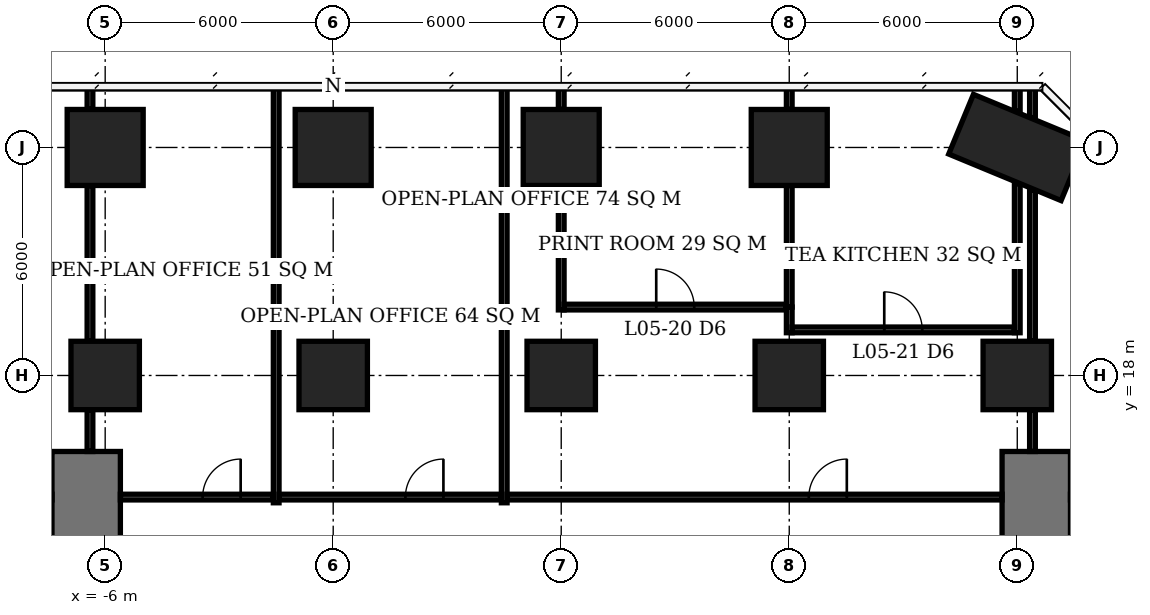
"""IFC4 building model, lengths in metres.
Left out: names, types, materials, properties, quantities, classifications, styles, units other than length and angle.
Written with IfcOpenShell. Run it as: python <this file> out.ifc"""

import sys

from ifc_helpers import new_model, si_unit, direction, frame, frame_2d, origin, origin_2d, place, context, subcontext, project, spatial, rectangle, extrude, element, fill, save


model = new_model("IFC4")
c1 = context("Model", 3, precision=1e-05, world=origin(), true_north=direction((0.0, 1.0)))
c2 = subcontext(c1, "Body", "Model", "MODEL_VIEW")
j1 = project(units=[si_unit("LENGTHUNIT", "METRE"), si_unit("PLANEANGLEUNIT", "RADIAN")], contexts=[c1])
p1 = place(None, origin())
s1 = spatial("IfcSite", under=j1, at=p1, CompositionType="ELEMENT")
p2 = place(p1, origin())
s2 = spatial("IfcBuilding", under=s1, at=p2, CompositionType="ELEMENT")
p3 = place(p2, frame((0.0, 0.0, 26.0)))
s3 = spatial("IfcBuildingStorey", under=s2, at=p3, CompositionType="ELEMENT", Elevation=26.0)
p4 = place(p3, frame((-6.0, 18.0, 0.0), z_axis=(0.0, 0.0, 1.0), x_axis=(1.0, 0.0, 0.0)))
e1 = element("IfcColumn", 1, at=p4, inside=s3, PredefinedType="COLUMN", context=c2, shape_type="SweptSolid", body=[
    extrude(rectangle(XDim=1.8, YDim=1.8, at=origin_2d()), origin(), (0.0, 0.0, 1.0), 3.9),
])
p5 = place(p3, frame((-6.0, 24.0, 0.0), z_axis=(0.0, 0.0, 1.0), x_axis=(1.0, 0.0, 0.0)))
e2 = element("IfcColumn", 2, at=p5, inside=s3, PredefinedType="COLUMN", context=c2, shape_type="SweptSolid", body=[
    extrude(rectangle(XDim=2.0, YDim=2.0, at=origin_2d()), origin(), (0.0, 0.0, 1.0), 3.9),
])
p6 = place(p3, frame((0.0, 18.0, 0.0), z_axis=(0.0, 0.0, 1.0), x_axis=(1.0, 0.0, 0.0)))
e3 = element("IfcColumn", 3, at=p6, inside=s3, PredefinedType="COLUMN", context=c2, shape_type="SweptSolid", body=[
    extrude(rectangle(XDim=1.8, YDim=1.8, at=origin_2d()), origin(), (0.0, 0.0, 1.0), 3.9),
])
p7 = place(p3, frame((0.0, 24.0, 0.0), z_axis=(0.0, 0.0, 1.0), x_axis=(1.0, 0.0, 0.0)))
e4 = element("IfcColumn", 4, at=p7, inside=s3, PredefinedType="COLUMN", context=c2, shape_type="SweptSolid", body=[
    extrude(rectangle(XDim=2.0, YDim=2.0, at=origin_2d()), origin(), (0.0, 0.0, 1.0), 3.9),
])
p8 = place(p3, frame((6.0, 18.0, 0.0), z_axis=(0.0, 0.0, 1.0), x_axis=(1.0, 0.0, 0.0)))
e5 = element("IfcColumn", 5, at=p8, inside=s3, PredefinedType="COLUMN", context=c2, shape_type="SweptSolid", body=[
    extrude(rectangle(XDim=1.8, YDim=1.8, at=origin_2d()), origin(), (0.0, 0.0, 1.0), 3.9),
])
p9 = place(p3, frame((6.0, 24.0, 0.0), z_axis=(0.0, 0.0, 1.0), x_axis=(1.0, 0.0, 0.0)))
e6 = element("IfcColumn", 6, at=p9, inside=s3, PredefinedType="COLUMN", context=c2, shape_type="SweptSolid", body=[
    extrude(rectangle(XDim=2.0, YDim=2.0, at=origin_2d()), origin(), (0.0, 0.0, 1.0), 3.9),
])
p10 = place(p3, frame((12.0, 18.0, 0.0), z_axis=(0.0, 0.0, 1.0), x_axis=(1.0, 0.0, 0.0)))
e7 = element("IfcColumn", 7, at=p10, inside=s3, PredefinedType="COLUMN", context=c2, shape_type="SweptSolid", body=[
    extrude(rectangle(XDim=1.8, YDim=1.8, at=origin_2d()), origin(), (0.0, 0.0, 1.0), 3.9),
])
p11 = place(p3, frame((12.0, 24.0, 0.0), z_axis=(0.0, 0.0, 1.0), x_axis=(1.0, 0.0, 0.0)))
e8 = element("IfcColumn", 8, at=p11, inside=s3, PredefinedType="COLUMN", context=c2, shape_type="SweptSolid", body=[
    extrude(rectangle(XDim=2.0, YDim=2.0, at=origin_2d()), origin(), (0.0, 0.0, 1.0), 3.9),
])
p12 = place(p3, frame((18.0, 18.0, 0.0), z_axis=(0.0, 0.0, 1.0), x_axis=(1.0, 0.0, 0.0)))
e9 = element("IfcColumn", 9, at=p12, inside=s3, PredefinedType="COLUMN", context=c2, shape_type="SweptSolid", body=[
    extrude(rectangle(XDim=1.8, YDim=1.8, at=origin_2d()), origin(), (0.0, 0.0, 1.0), 3.9),
])
p13 = place(p3, frame((18.0, 24.0, 0.0), z_axis=(0.0, 0.0, 1.0), x_axis=(0.923879532511, -0.382683432365, 0.0)))
e10 = element("IfcColumn", 10, at=p13, inside=s3, PredefinedType="COLUMN", context=c2, shape_type="SweptSolid", body=[
    extrude(rectangle(XDim=3.2, YDim=1.7, at=origin_2d()), origin(), (0.0, 0.0, 1.0), 3.9),
])
for number, where, z_axis, x_axis in (
    (11, (-6.5, 13.6, 0.0), (0.0, 0.0, 1.0), (0.0, 1.0, 0.0)),
    (12, (18.5, 13.6, 0.0), (0.0, 0.0, 1.0), (0.0, 1.0, 0.0)),
):
    element("IfcWall", number, at=place(p3, frame(where, z_axis=z_axis, x_axis=x_axis)), inside=s3, PredefinedType="SHEAR", context=c2, shape_type="SweptSolid", body=[
        extrude(rectangle(XDim=2.4, YDim=1.8, at=frame_2d((1.2, 0.0))), origin(), (0.0, 0.0, 1.0), 3.9),
    ])
p14 = place(p3, frame((12.075, 19.2, 0.0), z_axis=(0.0, 0.0, 1.0), x_axis=(1.0, 0.0, 0.0)))
e13 = element("IfcWall", 13, at=p14, inside=s3, PredefinedType="PARTITIONING", context=c2, shape_type="SweptSolid", body=[
    extrude(rectangle(XDim=5.85, YDim=0.15, at=frame_2d((2.925, 0.0))), origin(), (0.0, 0.0, 1.0), 3.65),
])
p15 = place(p14, frame((2.425, 0.0, 0.0)))
e14 = element("IfcOpeningElement", 14, at=p15, cuts=e13, PredefinedType="OPENING", context=c2, shape_type="SweptSolid", body=[
    extrude(rectangle(XDim=1.0, YDim=2.1, at=frame_2d((0.5, 1.05))), frame((0.0, 0.085, 0.0), z_axis=(0.0, -1.0, 0.0), x_axis=(1.0, 0.0, 0.0)), (0.0, 0.0, 1.0), 0.17),
])
p16 = place(p3, frame((6.075, 19.8, 0.0), z_axis=(0.0, 0.0, 1.0), x_axis=(1.0, 0.0, 0.0)))
e15 = element("IfcWall", 15, at=p16, inside=s3, PredefinedType="PARTITIONING", context=c2, shape_type="SweptSolid", body=[
    extrude(rectangle(XDim=5.85, YDim=0.15, at=frame_2d((2.925, 0.0))), origin(), (0.0, 0.0, 1.0), 3.65),
])
p17 = place(p16, frame((2.425, 0.0, 0.0)))
e16 = element("IfcOpeningElement", 16, at=p17, cuts=e15, PredefinedType="OPENING", context=c2, shape_type="SweptSolid", body=[
    extrude(rectangle(XDim=1.0, YDim=2.1, at=frame_2d((0.5, 1.05))), frame((0.0, 0.085, 0.0), z_axis=(0.0, -1.0, 0.0), x_axis=(1.0, 0.0, 0.0)), (0.0, 0.0, 1.0), 0.17),
])
p18 = place(p3, frame((6.0, 19.725, 0.0), z_axis=(0.0, 0.0, 1.0), x_axis=(0.0, 1.0, 0.0)))
e17 = element("IfcWall", 17, at=p18, inside=s3, PredefinedType="PARTITIONING", context=c2, shape_type="SweptSolid", body=[
    extrude(rectangle(XDim=3.275, YDim=0.15, at=frame_2d((1.637, 0.0))), origin(), (0.0, 0.0, 1.0), 3.65),
])
p19 = place(p3, frame((6.0, 25.0, 0.0), z_axis=(0.0, 0.0, 1.0), x_axis=(0.0, 1.0, 0.0)))
e18 = element("IfcWall", 18, at=p19, inside=s3, PredefinedType="PARTITIONING", context=c2, shape_type="SweptSolid", body=[
    extrude(rectangle(XDim=0.6, YDim=0.15, at=frame_2d((0.3, 0.0))), origin(), (0.0, 0.0, 1.0), 3.65),
])
p20 = place(p3, frame((12.0, 19.125, 0.0), z_axis=(0.0, 0.0, 1.0), x_axis=(0.0, 1.0, 0.0)))
e19 = element("IfcWall", 19, at=p20, inside=s3, PredefinedType="PARTITIONING", context=c2, shape_type="SweptSolid", body=[
    extrude(rectangle(XDim=0.675, YDim=0.15, at=frame_2d((0.337, 0.0))), origin(), (0.0, 0.0, 1.0), 3.65),
])
p21 = place(p3, frame((12.0, 19.8, 0.0), z_axis=(0.0, 0.0, 1.0), x_axis=(0.0, 1.0, 0.0)))
e20 = element("IfcWall", 20, at=p21, inside=s3, PredefinedType="PARTITIONING", context=c2, shape_type="SweptSolid", body=[
    extrude(rectangle(XDim=3.2, YDim=0.15, at=frame_2d((1.6, 0.0))), origin(), (0.0, 0.0, 1.0), 3.65),
])
p22 = place(p3, frame((12.0, 25.0, 0.0), z_axis=(0.0, 0.0, 1.0), x_axis=(0.0, 1.0, 0.0)))
e21 = element("IfcWall", 21, at=p22, inside=s3, PredefinedType="PARTITIONING", context=c2, shape_type="SweptSolid", body=[
    extrude(rectangle(XDim=0.6, YDim=0.15, at=frame_2d((0.3, 0.0))), origin(), (0.0, 0.0, 1.0), 3.65),
])
p23 = place(p3, frame((18.0, 19.125, 0.0), z_axis=(0.0, 0.0, 1.0), x_axis=(0.0, 1.0, 0.0)))
e22 = element("IfcWall", 22, at=p23, inside=s3, PredefinedType="PARTITIONING", context=c2, shape_type="SweptSolid", body=[
    extrude(rectangle(XDim=3.924, YDim=0.15, at=frame_2d((1.962, 0.0))), origin(), (0.0, 0.0, 1.0), 3.65),
])
p24 = place(p3, frame((18.0, 24.951, 0.0), z_axis=(0.0, 0.0, 1.0), x_axis=(0.0, 1.0, 0.0)))
e23 = element("IfcWall", 23, at=p24, inside=s3, PredefinedType="PARTITIONING", context=c2, shape_type="SweptSolid", body=[
    extrude(rectangle(XDim=0.649, YDim=0.15, at=frame_2d((0.324, 0.0))), origin(), (0.0, 0.0, 1.0), 3.65),
])
p25 = place(p3, frame((-6.4, 16.0, 0.0), z_axis=(0.0, 0.0, 1.0), x_axis=(0.0, 1.0, 0.0)))
e24 = element("IfcWall", 24, at=p25, inside=s3, PredefinedType="PARTITIONING", context=c2, shape_type="SweptSolid", body=[
    extrude(rectangle(XDim=1.1, YDim=0.15, at=frame_2d((0.55, 0.0))), origin(), (0.0, 0.0, 1.0), 3.65),
])
p26 = place(p3, frame((-6.4, 18.9, 0.0), z_axis=(0.0, 0.0, 1.0), x_axis=(0.0, 1.0, 0.0)))
e25 = element("IfcWall", 25, at=p26, inside=s3, PredefinedType="PARTITIONING", context=c2, shape_type="SweptSolid", body=[
    extrude(rectangle(XDim=4.1, YDim=0.15, at=frame_2d((2.05, 0.0))), origin(), (0.0, 0.0, 1.0), 3.65),
])
p27 = place(p3, frame((-6.4, 25.0, 0.0), z_axis=(0.0, 0.0, 1.0), x_axis=(0.0, 1.0, 0.0)))
e26 = element("IfcWall", 26, at=p27, inside=s3, PredefinedType="PARTITIONING", context=c2, shape_type="SweptSolid", body=[
    extrude(rectangle(XDim=0.6, YDim=0.15, at=frame_2d((0.3, 0.0))), origin(), (0.0, 0.0, 1.0), 3.65),
])
p28 = place(p3, frame((-5.6, 14.8, 0.0), z_axis=(0.0, 0.0, 1.0), x_axis=(1.0, 0.0, 0.0)))
e27 = element("IfcWall", 27, at=p28, inside=s3, PredefinedType="PARTITIONING", context=c2, shape_type="SweptSolid", body=[
    extrude(rectangle(XDim=4.025, YDim=0.15, at=frame_2d((2.013, 0.0))), origin(), (0.0, 0.0, 1.0), 3.65),
])
p29 = place(p28, frame((2.165, 0.0, 0.0)))
e28 = element("IfcOpeningElement", 28, at=p29, cuts=e27, PredefinedType="OPENING", context=c2, shape_type="SweptSolid", body=[
    extrude(rectangle(XDim=1.0, YDim=2.1, at=frame_2d((0.5, 1.05))), frame((0.0, 0.085, 0.0), z_axis=(0.0, -1.0, 0.0), x_axis=(1.0, 0.0, 0.0)), (0.0, 0.0, 1.0), 0.17),
])
p30 = place(p3, frame((-1.5, 14.65, 0.0), z_axis=(0.0, 0.0, 1.0), x_axis=(0.0, 1.0, 0.0)))
e29 = element("IfcWall", 29, at=p30, inside=s3, PredefinedType="PARTITIONING", context=c2, shape_type="SweptSolid", body=[
    extrude(rectangle(XDim=10.95, YDim=0.15, at=frame_2d((5.475, 0.0))), origin(), (0.0, 0.0, 1.0), 3.65),
])
p31 = place(p3, frame((-1.425, 14.8, 0.0), z_axis=(0.0, 0.0, 1.0), x_axis=(1.0, 0.0, 0.0)))
e30 = element("IfcWall", 30, at=p31, inside=s3, PredefinedType="PARTITIONING", context=c2, shape_type="SweptSolid", body=[
    extrude(rectangle(XDim=5.85, YDim=0.15, at=frame_2d((2.925, 0.0))), origin(), (0.0, 0.0, 1.0), 3.65),
])
p32 = place(p31, frame((3.325, 0.0, 0.0)))
e31 = element("IfcOpeningElement", 31, at=p32, cuts=e30, PredefinedType="OPENING", context=c2, shape_type="SweptSolid", body=[
    extrude(rectangle(XDim=1.0, YDim=2.1, at=frame_2d((0.5, 1.05))), frame((0.0, 0.085, 0.0), z_axis=(0.0, -1.0, 0.0), x_axis=(1.0, 0.0, 0.0)), (0.0, 0.0, 1.0), 0.17),
])
p33 = place(p3, frame((4.5, 14.65, 0.0), z_axis=(0.0, 0.0, 1.0), x_axis=(0.0, 1.0, 0.0)))
e32 = element("IfcWall", 32, at=p33, inside=s3, PredefinedType="PARTITIONING", context=c2, shape_type="SweptSolid", body=[
    extrude(rectangle(XDim=10.95, YDim=0.15, at=frame_2d((5.475, 0.0))), origin(), (0.0, 0.0, 1.0), 3.65),
])
p34 = place(p3, frame((4.575, 14.8, 0.0), z_axis=(0.0, 0.0, 1.0), x_axis=(1.0, 0.0, 0.0)))
e33 = element("IfcWall", 33, at=p34, inside=s3, PredefinedType="PARTITIONING", context=c2, shape_type="SweptSolid", body=[
    extrude(rectangle(XDim=13.025, YDim=0.15, at=frame_2d((6.513, 0.0))), origin(), (0.0, 0.0, 1.0), 3.65),
])
p35 = place(p34, frame((7.94, 0.0, 0.0)))
e34 = element("IfcOpeningElement", 34, at=p35, cuts=e33, PredefinedType="OPENING", context=c2, shape_type="SweptSolid", body=[
    extrude(rectangle(XDim=1.0, YDim=2.1, at=frame_2d((0.5, 1.05))), frame((0.0, 0.085, 0.0), z_axis=(0.0, -1.0, 0.0), x_axis=(1.0, 0.0, 0.0)), (0.0, 0.0, 1.0), 0.17),
])
p36 = place(p3, frame((18.4, 16.0, 0.0), z_axis=(0.0, 0.0, 1.0), x_axis=(0.0, 1.0, 0.0)))
e35 = element("IfcWall", 35, at=p36, inside=s3, PredefinedType="PARTITIONING", context=c2, shape_type="SweptSolid", body=[
    extrude(rectangle(XDim=1.1, YDim=0.15, at=frame_2d((0.55, 0.0))), origin(), (0.0, 0.0, 1.0), 3.65),
])
p37 = place(p3, frame((18.4, 18.9, 0.0), z_axis=(0.0, 0.0, 1.0), x_axis=(0.0, 1.0, 0.0)))
e36 = element("IfcWall", 36, at=p37, inside=s3, PredefinedType="PARTITIONING", context=c2, shape_type="SweptSolid", body=[
    extrude(rectangle(XDim=3.983, YDim=0.15, at=frame_2d((1.992, 0.0))), origin(), (0.0, 0.0, 1.0), 3.65),
])
p38 = place(p3, frame((18.4, 24.785, 0.0), z_axis=(0.0, 0.0, 1.0), x_axis=(0.0, 1.0, 0.0)))
e37 = element("IfcWall", 37, at=p38, inside=s3, PredefinedType="PARTITIONING", context=c2, shape_type="SweptSolid", body=[
    extrude(rectangle(XDim=0.815, YDim=0.15, at=frame_2d((0.407, 0.0))), origin(), (0.0, 0.0, 1.0), 3.65),
])
p39 = place(p17, origin())
e38 = element("IfcDoor", 38, at=p39, inside=s3, OperationType="SINGLE_SWING_LEFT", PredefinedType="DOOR", context=c2, shape_type="SweptSolid", body=[
    extrude(rectangle(XDim=1.0, YDim=2.1, at=frame_2d((0.5, 1.05))), frame((0.0, 0.025, 0.0), z_axis=(0.0, -1.0, 0.0), x_axis=(1.0, 0.0, 0.0)), (0.0, 0.0, 1.0), 0.05),
])
fill(e16, e38)
p40 = place(p15, origin())
e39 = element("IfcDoor", 39, at=p40, inside=s3, OperationType="SINGLE_SWING_LEFT", PredefinedType="DOOR", context=c2, shape_type="SweptSolid", body=[
    extrude(rectangle(XDim=1.0, YDim=2.1, at=frame_2d((0.5, 1.05))), frame((0.0, 0.025, 0.0), z_axis=(0.0, -1.0, 0.0), x_axis=(1.0, 0.0, 0.0)), (0.0, 0.0, 1.0), 0.05),
])
fill(e14, e39)
p41 = place(p35, origin())
e40 = element("IfcDoor", 40, at=p41, inside=s3, OperationType="SINGLE_SWING_RIGHT", PredefinedType="DOOR", context=c2, shape_type="SweptSolid", body=[
    extrude(rectangle(XDim=1.0, YDim=2.1, at=frame_2d((0.5, 1.05))), frame((0.0, 0.025, 0.0), z_axis=(0.0, -1.0, 0.0), x_axis=(1.0, 0.0, 0.0)), (0.0, 0.0, 1.0), 0.05),
])
fill(e34, e40)
p42 = place(p32, origin())
e41 = element("IfcDoor", 41, at=p42, inside=s3, OperationType="SINGLE_SWING_RIGHT", PredefinedType="DOOR", context=c2, shape_type="SweptSolid", body=[
    extrude(rectangle(XDim=1.0, YDim=2.1, at=frame_2d((0.5, 1.05))), frame((0.0, 0.025, 0.0), z_axis=(0.0, -1.0, 0.0), x_axis=(1.0, 0.0, 0.0)), (0.0, 0.0, 1.0), 0.05),
])
fill(e31, e41)
p43 = place(p29, origin())
e42 = element("IfcDoor", 42, at=p43, inside=s3, OperationType="SINGLE_SWING_RIGHT", PredefinedType="DOOR", context=c2, shape_type="SweptSolid", body=[
    extrude(rectangle(XDim=1.0, YDim=2.1, at=frame_2d((0.5, 1.05))), frame((0.0, 0.025, 0.0), z_axis=(0.0, -1.0, 0.0), x_axis=(1.0, 0.0, 0.0)), (0.0, 0.0, 1.0), 0.05),
])
fill(e28, e42)
save(model, sys.argv[1])
